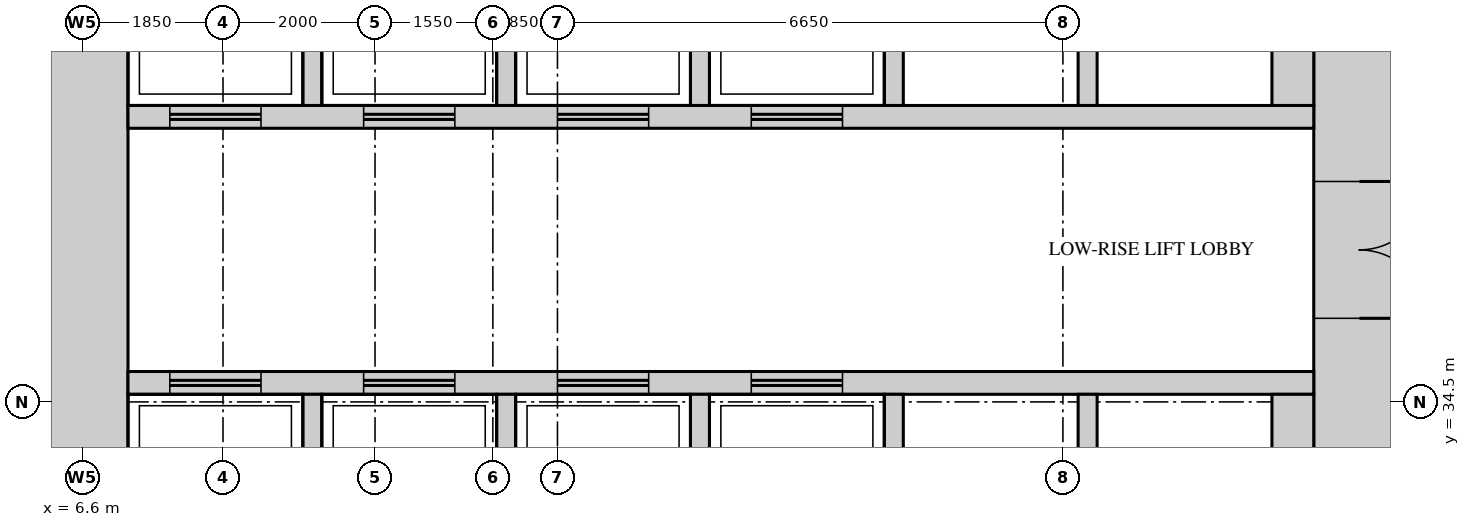
"""IFC4 building model, lengths in metres.
Left out: names, types, materials, properties, quantities, classifications, styles, units other than length and angle.
Written with IfcOpenShell. Run it as: python <this file> out.ifc"""

import sys

from ifc_helpers import new_model, si_unit, direction, frame, frame_2d, origin, place, context, subcontext, project, spatial, rectangle, extrude, source, transform, mapped, element, fill, save


model = new_model("IFC4")
c1 = context("Model", 3, precision=1e-05, world=origin(), true_north=direction((0.0, 1.0)))
c2 = subcontext(c1, "Body", "Model", "MODEL_VIEW")
j1 = project(units=[si_unit("LENGTHUNIT", "METRE"), si_unit("PLANEANGLEUNIT", "RADIAN")], contexts=[c1])
p1 = place(None, origin())
s1 = spatial("IfcSite", under=j1, at=p1, CompositionType="ELEMENT")
p2 = place(p1, origin())
s2 = spatial("IfcBuilding", under=s1, at=p2, CompositionType="ELEMENT")
p3 = place(p2, frame((0.0, 0.0, 64.5)))
s3 = spatial("IfcBuildingStorey", under=s2, at=p3, CompositionType="ELEMENT", Elevation=64.5)
m1 = source(origin(), c2, "Body", "SweptSolid", [
    extrude(rectangle(XDim=27.6, YDim=1.2, at=frame_2d((13.8, 0.0))), origin(), (0.0, 0.0, 1.0), 4.2),
])
p4 = place(p3, frame((23.4, 13.2, 0.0), z_axis=(0.0, 0.0, 1.0), x_axis=(0.0, 1.0, 0.0)))
e1 = element("IfcWall", 1, at=p4, inside=s3, PredefinedType="SHEAR", context=c2, shape_type="MappedRepresentation", body=[
    mapped(m1, transform((0.0, 0.0, 0.0))),
])
m2 = source(origin(), c2, "Body", "SweptSolid", [
    extrude(rectangle(XDim=1.8, YDim=2.1, at=frame_2d((0.9, 1.05))), frame((0.0, 0.61, 0.0), z_axis=(0.0, -1.0, 0.0), x_axis=(1.0, 0.0, 0.0)), (0.0, 0.0, 1.0), 1.22),
])
p5 = place(p4, frame((22.4, 0.0, 0.0)))
e2 = element("IfcOpeningElement", 2, at=p5, cuts=e1, PredefinedType="OPENING", context=c2, shape_type="MappedRepresentation", body=[
    mapped(m2, transform((0.0, 0.0, 0.0))),
])
m3 = source(origin(), c2, "Body", "SweptSolid", [
    extrude(rectangle(XDim=1.2, YDim=2.1, at=frame_2d((0.6, 1.05))), frame((0.0, 0.61, 0.0), z_axis=(0.0, -1.0, 0.0), x_axis=(1.0, 0.0, 0.0)), (0.0, 0.0, 1.0), 1.22),
])
p6 = place(p4, frame((12.15, 0.0, 0.0)))
e3 = element("IfcOpeningElement", 3, at=p6, cuts=e1, PredefinedType="OPENING", context=c2, shape_type="MappedRepresentation", body=[
    mapped(m3, transform((0.0, 0.0, 0.0))),
])
m4 = source(origin(), c2, "Body", "SweptSolid", [
    extrude(rectangle(XDim=0.9, YDim=2.1, at=frame_2d((0.45, 1.05))), frame((0.0, 0.61, 0.0), z_axis=(0.0, -1.0, 0.0), x_axis=(1.0, 0.0, 0.0)), (0.0, 0.0, 1.0), 1.22),
])
p7 = place(p4, frame((4.4, 0.0, 0.0)))
e4 = element("IfcOpeningElement", 4, at=p7, cuts=e1, PredefinedType="OPENING", context=c2, shape_type="MappedRepresentation", body=[
    mapped(m4, transform((0.0, 0.0, 0.0))),
])
p8 = place(p3, frame((6.6, 13.2, 0.0), z_axis=(0.0, 0.0, 1.0), x_axis=(0.0, 1.0, 0.0)))
e5 = element("IfcWall", 5, at=p8, inside=s3, PredefinedType="SHEAR", context=c2, shape_type="MappedRepresentation", body=[
    mapped(m1, transform((0.0, 0.0, 0.0))),
])
m5 = source(origin(), c2, "Body", "SweptSolid", [
    extrude(rectangle(XDim=15.6, YDim=0.3, at=frame_2d((7.8, 0.0))), origin(), (0.0, 0.0, 1.0), 4.2),
])
p9 = place(p3, frame((7.2, 38.25, 0.0), z_axis=(0.0, 0.0, 1.0), x_axis=(1.0, 0.0, 0.0)))
e6 = element("IfcWall", 6, at=p9, inside=s3, PredefinedType="STANDARD", context=c2, shape_type="MappedRepresentation", body=[
    mapped(m5, transform((0.0, 0.0, 0.0))),
])
m6 = source(origin(), c2, "Body", "SweptSolid", [
    extrude(rectangle(XDim=1.2, YDim=2.1, at=frame_2d((0.6, 1.05))), frame((0.0, 0.16, 0.0), z_axis=(0.0, -1.0, 0.0), x_axis=(1.0, 0.0, 0.0)), (0.0, 0.0, 1.0), 0.32),
])
p10 = place(p9, frame((0.55, 0.0, 0.0)))
e7 = element("IfcOpeningElement", 7, at=p10, cuts=e6, PredefinedType="OPENING", context=c2, shape_type="MappedRepresentation", body=[
    mapped(m6, transform((0.0, 0.0, 0.0))),
])
p11 = place(p9, frame((3.1, 0.0, 0.0)))
e8 = element("IfcOpeningElement", 8, at=p11, cuts=e6, PredefinedType="OPENING", context=c2, shape_type="MappedRepresentation", body=[
    mapped(m6, transform((0.0, 0.0, 0.0))),
])
p12 = place(p9, frame((5.65, 0.0, 0.0)))
e9 = element("IfcOpeningElement", 9, at=p12, cuts=e6, PredefinedType="OPENING", context=c2, shape_type="MappedRepresentation", body=[
    mapped(m6, transform((0.0, 0.0, 0.0))),
])
p13 = place(p9, frame((8.2, 0.0, 0.0)))
e10 = element("IfcOpeningElement", 10, at=p13, cuts=e6, PredefinedType="OPENING", context=c2, shape_type="MappedRepresentation", body=[
    mapped(m6, transform((0.0, 0.0, 0.0))),
])
p14 = place(p3, frame((7.2, 34.75, 0.0), z_axis=(0.0, 0.0, 1.0), x_axis=(1.0, 0.0, 0.0)))
e11 = element("IfcWall", 11, at=p14, inside=s3, PredefinedType="STANDARD", context=c2, shape_type="MappedRepresentation", body=[
    mapped(m5, transform((0.0, 0.0, 0.0))),
])
p15 = place(p14, frame((0.55, 0.0, 0.0)))
e12 = element("IfcOpeningElement", 12, at=p15, cuts=e11, PredefinedType="OPENING", context=c2, shape_type="MappedRepresentation", body=[
    mapped(m6, transform((0.0, 0.0, 0.0))),
])
p16 = place(p14, frame((3.1, 0.0, 0.0)))
e13 = element("IfcOpeningElement", 13, at=p16, cuts=e11, PredefinedType="OPENING", context=c2, shape_type="MappedRepresentation", body=[
    mapped(m6, transform((0.0, 0.0, 0.0))),
])
p17 = place(p14, frame((5.65, 0.0, 0.0)))
e14 = element("IfcOpeningElement", 14, at=p17, cuts=e11, PredefinedType="OPENING", context=c2, shape_type="MappedRepresentation", body=[
    mapped(m6, transform((0.0, 0.0, 0.0))),
])
p18 = place(p14, frame((8.2, 0.0, 0.0)))
e15 = element("IfcOpeningElement", 15, at=p18, cuts=e11, PredefinedType="OPENING", context=c2, shape_type="MappedRepresentation", body=[
    mapped(m6, transform((0.0, 0.0, 0.0))),
])
m7 = source(origin(), c2, "Body", "SweptSolid", [
    extrude(rectangle(XDim=2.4, YDim=0.25, at=frame_2d((1.2, 0.0))), origin(), (0.0, 0.0, 1.0), 4.2),
])
for number, where, z_axis, x_axis in (
    (16, (9.625, 38.4, 0.0), (0.0, 0.0, 1.0), (0.0, 1.0, 0.0)),
    (17, (12.175, 38.4, 0.0), (0.0, 0.0, 1.0), (0.0, 1.0, 0.0)),
    (18, (14.725, 38.4, 0.0), (0.0, 0.0, 1.0), (0.0, 1.0, 0.0)),
    (19, (17.275, 38.4, 0.0), (0.0, 0.0, 1.0), (0.0, 1.0, 0.0)),
    (20, (19.825, 38.4, 0.0), (0.0, 0.0, 1.0), (0.0, 1.0, 0.0)),
):
    element("IfcWall", number, at=place(p3, frame(where, z_axis=z_axis, x_axis=x_axis)), inside=s3, PredefinedType="STANDARD", context=c2, shape_type="MappedRepresentation", body=[
        mapped(m7, transform((0.0, 0.0, 0.0))),
    ])
m8 = source(origin(), c2, "Body", "SweptSolid", [
    extrude(rectangle(XDim=2.4, YDim=0.55, at=frame_2d((1.2, 0.0))), origin(), (0.0, 0.0, 1.0), 4.2),
])
p19 = place(p3, frame((22.525, 38.4, 0.0), z_axis=(0.0, 0.0, 1.0), x_axis=(0.0, 1.0, 0.0)))
e21 = element("IfcWall", 21, at=p19, inside=s3, PredefinedType="STANDARD", context=c2, shape_type="MappedRepresentation", body=[
    mapped(m8, transform((0.0, 0.0, 0.0))),
])
for number, where, z_axis, x_axis in (
    (22, (9.625, 32.2, 0.0), (0.0, 0.0, 1.0), (0.0, 1.0, 0.0)),
    (23, (12.175, 32.2, 0.0), (0.0, 0.0, 1.0), (0.0, 1.0, 0.0)),
    (24, (14.725, 32.2, 0.0), (0.0, 0.0, 1.0), (0.0, 1.0, 0.0)),
    (25, (17.275, 32.2, 0.0), (0.0, 0.0, 1.0), (0.0, 1.0, 0.0)),
    (26, (19.825, 32.2, 0.0), (0.0, 0.0, 1.0), (0.0, 1.0, 0.0)),
):
    element("IfcWall", number, at=place(p3, frame(where, z_axis=z_axis, x_axis=x_axis)), inside=s3, PredefinedType="STANDARD", context=c2, shape_type="MappedRepresentation", body=[
        mapped(m7, transform((0.0, 0.0, 0.0))),
    ])
p20 = place(p3, frame((22.525, 32.2, 0.0), z_axis=(0.0, 0.0, 1.0), x_axis=(0.0, 1.0, 0.0)))
e27 = element("IfcWall", 27, at=p20, inside=s3, PredefinedType="STANDARD", context=c2, shape_type="MappedRepresentation", body=[
    mapped(m8, transform((0.0, 0.0, 0.0))),
])
m9 = source(origin(), c2, "Body", "SweptSolid", [
    extrude(rectangle(XDim=1.8, YDim=2.1, at=frame_2d((0.9, 1.05))), frame((0.0, 0.55, 0.0), z_axis=(0.0, -1.0, 0.0), x_axis=(1.0, 0.0, 0.0)), (0.0, 0.0, 1.0), 1.1),
])
p21 = place(p5, origin())
e28 = element("IfcDoor", 28, at=p21, inside=s3, OperationType="DOUBLE_DOOR_SINGLE_SWING", PredefinedType="DOOR", context=c2, shape_type="MappedRepresentation", body=[
    mapped(m9, transform((0.0, 0.0, 0.0))),
])
fill(e2, e28)
m10 = source(origin(), c2, "Body", "SweptSolid", [
    extrude(rectangle(XDim=1.2, YDim=2.1, at=frame_2d((0.6, 1.05))), frame((0.0, 0.025, 0.0), z_axis=(0.0, -1.0, 0.0), x_axis=(1.0, 0.0, 0.0)), (0.0, 0.0, 1.0), 0.05),
])
p22 = place(p15, origin())
e29 = element("IfcDoor", 29, at=p22, inside=s3, OperationType="DOUBLE_DOOR_SLIDING", PredefinedType="DOOR", context=c2, shape_type="MappedRepresentation", body=[
    mapped(m10, transform((0.0, 0.0, 0.0))),
])
fill(e12, e29)
p23 = place(p16, origin())
e30 = element("IfcDoor", 30, at=p23, inside=s3, OperationType="DOUBLE_DOOR_SLIDING", PredefinedType="DOOR", context=c2, shape_type="MappedRepresentation", body=[
    mapped(m10, transform((0.0, 0.0, 0.0))),
])
fill(e13, e30)
p24 = place(p17, origin())
e31 = element("IfcDoor", 31, at=p24, inside=s3, OperationType="DOUBLE_DOOR_SLIDING", PredefinedType="DOOR", context=c2, shape_type="MappedRepresentation", body=[
    mapped(m10, transform((0.0, 0.0, 0.0))),
])
fill(e14, e31)
p25 = place(p18, origin())
e32 = element("IfcDoor", 32, at=p25, inside=s3, OperationType="DOUBLE_DOOR_SLIDING", PredefinedType="DOOR", context=c2, shape_type="MappedRepresentation", body=[
    mapped(m10, transform((0.0, 0.0, 0.0))),
])
fill(e15, e32)
p26 = place(p10, origin())
e33 = element("IfcDoor", 33, at=p26, inside=s3, OperationType="DOUBLE_DOOR_SLIDING", PredefinedType="DOOR", context=c2, shape_type="MappedRepresentation", body=[
    mapped(m10, transform((0.0, 0.0, 0.0))),
])
fill(e7, e33)
p27 = place(p11, origin())
e34 = element("IfcDoor", 34, at=p27, inside=s3, OperationType="DOUBLE_DOOR_SLIDING", PredefinedType="DOOR", context=c2, shape_type="MappedRepresentation", body=[
    mapped(m10, transform((0.0, 0.0, 0.0))),
])
fill(e8, e34)
p28 = place(p12, origin())
e35 = element("IfcDoor", 35, at=p28, inside=s3, OperationType="DOUBLE_DOOR_SLIDING", PredefinedType="DOOR", context=c2, shape_type="MappedRepresentation", body=[
    mapped(m10, transform((0.0, 0.0, 0.0))),
])
fill(e9, e35)
p29 = place(p13, origin())
e36 = element("IfcDoor", 36, at=p29, inside=s3, OperationType="DOUBLE_DOOR_SLIDING", PredefinedType="DOOR", context=c2, shape_type="MappedRepresentation", body=[
    mapped(m10, transform((0.0, 0.0, 0.0))),
])
fill(e10, e36)
save(model, sys.argv[1])
